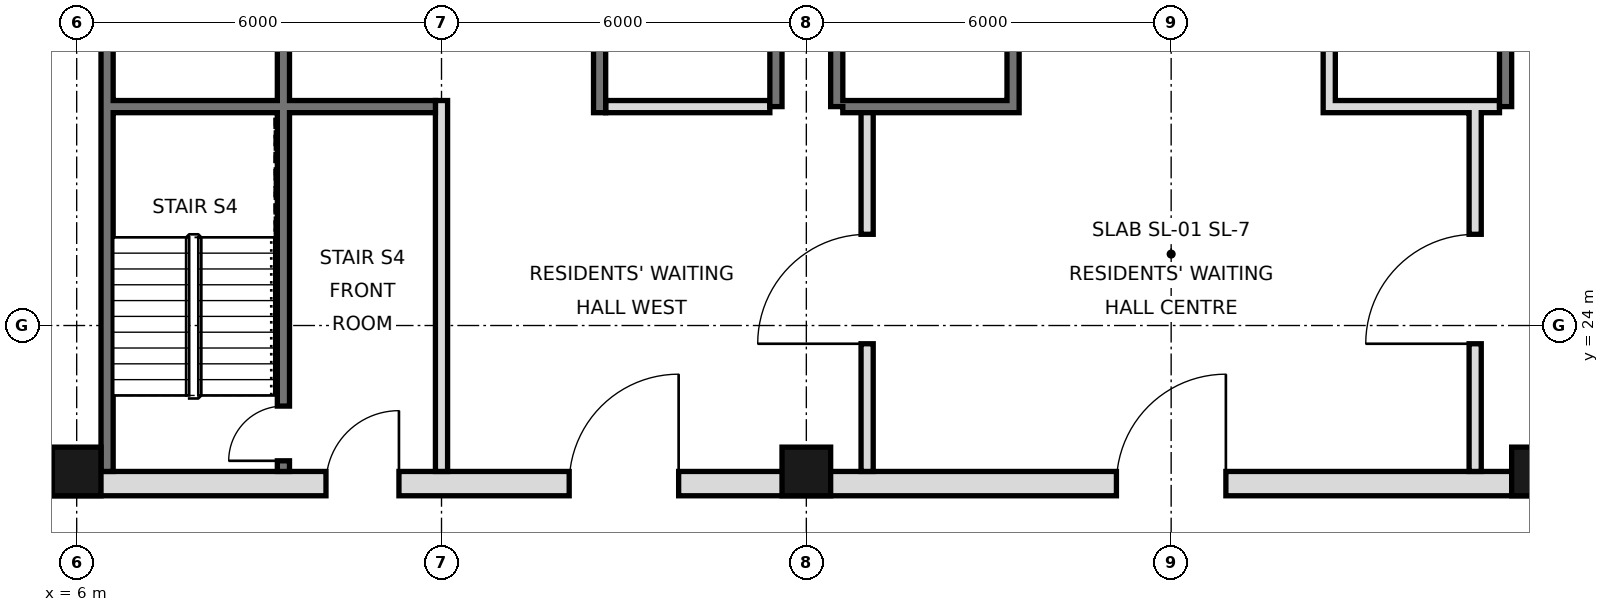
"""IFC4 building model, lengths in metres.
Left out: names, types, materials, properties, quantities, classifications, styles, units other than length and angle.
Written with IfcOpenShell. Run it as: python <this file> out.ifc"""

import sys

from ifc_helpers import new_model, si_unit, direction, frame, frame_2d, origin, origin_2d, place, context, subcontext, project, spatial, rectangle, hollow_rectangle, extrude, element, fill, save


model = new_model("IFC4")
c1 = context("Model", 3, precision=1e-05, world=origin(), true_north=direction((0.0, 1.0)))
c2 = subcontext(c1, "Body", "Model", "MODEL_VIEW")
j1 = project(units=[si_unit("LENGTHUNIT", "METRE"), si_unit("PLANEANGLEUNIT", "RADIAN")], contexts=[c1])
p1 = place(None, origin())
s1 = spatial("IfcSite", under=j1, at=p1, CompositionType="ELEMENT")
p2 = place(p1, origin())
s2 = spatial("IfcBuilding", under=s1, at=p2, CompositionType="ELEMENT")
p3 = place(p2, frame((0.0, 0.0, 202.8)))
s3 = spatial("IfcBuildingStorey", under=s2, at=p3, CompositionType="ELEMENT", Elevation=202.8)
for number, where, z_axis, x_axis in (
    (1, (6.0, 21.6, 0.0), (0.0, 0.0, 1.0), (1.0, 0.0, 0.0)),
    (2, (18.0, 21.6, 0.0), (0.0, 0.0, 1.0), (1.0, 0.0, 0.0)),
    (3, (30.0, 21.6, 0.0), (0.0, 0.0, 1.0), (1.0, 0.0, 0.0)),
):
    element("IfcColumn", number, at=place(p3, frame(where, z_axis=z_axis, x_axis=x_axis)), inside=s3, PredefinedType="COLUMN", context=c2, shape_type="SweptSolid", body=[
        extrude(hollow_rectangle(XDim=0.8, YDim=0.8, WallThickness=0.04, at=origin_2d()), origin(), (0.0, 0.0, 1.0), 3.6),
    ])
p4 = place(p3, frame((6.5, 21.6, 0.0), z_axis=(0.0, 0.0, 1.0), x_axis=(0.0, 1.0, 0.0)))
e4 = element("IfcWall", 4, at=p4, inside=s3, PredefinedType="SOLIDWALL", context=c2, shape_type="SweptSolid", body=[
    extrude(rectangle(XDim=23.5, YDim=0.2, at=frame_2d((11.75, 0.0))), origin(), (0.0, 0.0, 1.0), 3.42),
])
for number, where, z_axis, x_axis in (
    (5, (17.5, 27.6, 0.0), (0.0, 0.0, 1.0), (0.0, 1.0, 0.0)),
    (6, (18.5, 27.6, 0.0), (0.0, 0.0, 1.0), (0.0, 1.0, 0.0)),
    (7, (29.5, 27.6, 0.0), (0.0, 0.0, 1.0), (0.0, 1.0, 0.0)),
):
    element("IfcWall", number, at=place(p3, frame(where, z_axis=z_axis, x_axis=x_axis)), inside=s3, PredefinedType="SOLIDWALL", context=c2, shape_type="SweptSolid", body=[
        extrude(rectangle(XDim=17.5, YDim=0.2, at=frame_2d((8.75, 0.0))), origin(), (0.0, 0.0, 1.0), 3.42),
    ])
p5 = place(p3, frame((5.6, 21.4, 0.0), z_axis=(0.0, 0.0, 1.0), x_axis=(1.0, 0.0, 0.0)))
e8 = element("IfcWall", 8, at=p5, inside=s3, PredefinedType="SOLIDWALL", context=c2, shape_type="SweptSolid", body=[
    extrude(rectangle(XDim=36.8, YDim=0.4, at=frame_2d((18.4, 0.0))), origin(), (0.0, 0.0, 1.0), 3.42),
])
p6 = place(p5, frame((8.5, 0.0, 0.0)))
e9 = element("IfcOpeningElement", 9, at=p6, cuts=e8, PredefinedType="OPENING", context=c2, shape_type="SweptSolid", body=[
    extrude(rectangle(XDim=1.8, YDim=2.1, at=frame_2d((0.9, 1.05))), frame((0.0, 0.21, 0.0), z_axis=(0.0, -1.0, 0.0), x_axis=(1.0, 0.0, 0.0)), (0.0, 0.0, 1.0), 0.42),
])
p7 = place(p5, frame((17.5, 0.0, 0.0)))
e10 = element("IfcOpeningElement", 10, at=p7, cuts=e8, PredefinedType="OPENING", context=c2, shape_type="SweptSolid", body=[
    extrude(rectangle(XDim=1.8, YDim=2.1, at=frame_2d((0.9, 1.05))), frame((0.0, 0.21, 0.0), z_axis=(0.0, -1.0, 0.0), x_axis=(1.0, 0.0, 0.0)), (0.0, 0.0, 1.0), 0.42),
])
p8 = place(p5, frame((26.5, 0.0, 0.0)))
e11 = element("IfcOpeningElement", 11, at=p8, cuts=e8, PredefinedType="OPENING", context=c2, shape_type="SweptSolid", body=[
    extrude(rectangle(XDim=1.8, YDim=2.1, at=frame_2d((0.9, 1.05))), frame((0.0, 0.21, 0.0), z_axis=(0.0, -1.0, 0.0), x_axis=(1.0, 0.0, 0.0)), (0.0, 0.0, 1.0), 0.42),
])
p9 = place(p5, frame((4.5, 0.0, 0.0)))
e12 = element("IfcOpeningElement", 12, at=p9, cuts=e8, PredefinedType="OPENING", context=c2, shape_type="SweptSolid", body=[
    extrude(rectangle(XDim=1.2, YDim=2.1, at=frame_2d((0.6, 1.05))), frame((0.0, 0.21, 0.0), z_axis=(0.0, -1.0, 0.0), x_axis=(1.0, 0.0, 0.0)), (0.0, 0.0, 1.0), 0.42),
])
p10 = place(p5, frame((31.1, 0.0, 0.0)))
e13 = element("IfcOpeningElement", 13, at=p10, cuts=e8, PredefinedType="OPENING", context=c2, shape_type="SweptSolid", body=[
    extrude(rectangle(XDim=1.2, YDim=2.1, at=frame_2d((0.6, 1.05))), frame((0.0, 0.21, 0.0), z_axis=(0.0, -1.0, 0.0), x_axis=(1.0, 0.0, 0.0)), (0.0, 0.0, 1.0), 0.42),
])
p11 = place(p3, frame((19.0, 21.6, 0.0), z_axis=(0.0, 0.0, 1.0), x_axis=(0.0, 1.0, 0.0)))
e14 = element("IfcWall", 14, at=p11, inside=s3, PredefinedType="PARTITIONING", context=c2, shape_type="SweptSolid", body=[
    extrude(rectangle(XDim=6.0, YDim=0.2, at=frame_2d((3.0, 0.0))), origin(), (0.0, 0.0, 1.0), 3.42),
])
p12 = place(p11, frame((2.1, 0.0, 0.0)))
e15 = element("IfcOpeningElement", 15, at=p12, cuts=e14, PredefinedType="OPENING", context=c2, shape_type="SweptSolid", body=[
    extrude(rectangle(XDim=1.8, YDim=2.1, at=frame_2d((0.9, 1.05))), frame((0.0, 0.11, 0.0), z_axis=(0.0, -1.0, 0.0), x_axis=(1.0, 0.0, 0.0)), (0.0, 0.0, 1.0), 0.22),
])
p13 = place(p3, frame((29.0, 21.6, 0.0), z_axis=(0.0, 0.0, 1.0), x_axis=(0.0, 1.0, 0.0)))
e16 = element("IfcWall", 16, at=p13, inside=s3, PredefinedType="PARTITIONING", context=c2, shape_type="SweptSolid", body=[
    extrude(rectangle(XDim=6.0, YDim=0.2, at=frame_2d((3.0, 0.0))), origin(), (0.0, 0.0, 1.0), 3.42),
])
p14 = place(p13, frame((2.1, 0.0, 0.0)))
e17 = element("IfcOpeningElement", 17, at=p14, cuts=e16, PredefinedType="OPENING", context=c2, shape_type="SweptSolid", body=[
    extrude(rectangle(XDim=1.8, YDim=2.1, at=frame_2d((0.9, 1.05))), frame((0.0, 0.11, 0.0), z_axis=(0.0, -1.0, 0.0), x_axis=(1.0, 0.0, 0.0)), (0.0, 0.0, 1.0), 0.22),
])
p15 = place(p3, frame((12.0, 21.6, 0.0), z_axis=(0.0, 0.0, 1.0), x_axis=(0.0, 1.0, 0.0)))
e18 = element("IfcWall", 18, at=p15, inside=s3, PredefinedType="PARTITIONING", context=c2, shape_type="SweptSolid", body=[
    extrude(rectangle(XDim=6.1, YDim=0.2, at=frame_2d((3.05, 0.0))), origin(), (0.0, 0.0, 1.0), 3.42),
])
p16 = place(p3, frame((14.6, 27.5, 0.0), z_axis=(0.0, 0.0, 1.0), x_axis=(0.0, 1.0, 0.0)))
e19 = element("IfcWall", 19, at=p16, inside=s3, PredefinedType="SOLIDWALL", context=c2, shape_type="SweptSolid", body=[
    extrude(rectangle(XDim=17.5, YDim=0.2, at=frame_2d((8.75, 0.0))), origin(), (0.0, 0.0, 1.0), 3.42),
])
p17 = place(p16, frame((15.4, 0.0, 0.0)))
e20 = element("IfcOpeningElement", 20, at=p17, cuts=e19, PredefinedType="OPENING", context=c2, shape_type="SweptSolid", body=[
    extrude(rectangle(XDim=1.1, YDim=2.1, at=frame_2d((0.55, 1.05))), frame((0.0, 0.11, 0.0), z_axis=(0.0, -1.0, 0.0), x_axis=(1.0, 0.0, 0.0)), (0.0, 0.0, 1.0), 0.22),
])
p18 = place(p16, frame((2.7, 0.0, 0.0)))
e21 = element("IfcOpeningElement", 21, at=p18, cuts=e19, PredefinedType="OPENING", context=c2, shape_type="SweptSolid", body=[
    extrude(rectangle(XDim=1.0, YDim=2.1, at=frame_2d((0.5, 1.05))), frame((0.0, 0.11, 0.0), z_axis=(0.0, -1.0, 0.0), x_axis=(1.0, 0.0, 0.0)), (0.0, 0.0, 1.0), 0.22),
])
p19 = place(p16, frame((9.9, 0.0, 0.0)))
e22 = element("IfcOpeningElement", 22, at=p19, cuts=e19, PredefinedType="OPENING", context=c2, shape_type="SweptSolid", body=[
    extrude(rectangle(XDim=0.9, YDim=2.1, at=frame_2d((0.45, 1.05))), frame((0.0, 0.11, 0.0), z_axis=(0.0, -1.0, 0.0), x_axis=(1.0, 0.0, 0.0)), (0.0, 0.0, 1.0), 0.22),
])
p20 = place(p3, frame((21.4, 27.5, 0.0), z_axis=(0.0, 0.0, 1.0), x_axis=(0.0, 1.0, 0.0)))
e23 = element("IfcWall", 23, at=p20, inside=s3, PredefinedType="SOLIDWALL", context=c2, shape_type="SweptSolid", body=[
    extrude(rectangle(XDim=17.5, YDim=0.2, at=frame_2d((8.75, 0.0))), origin(), (0.0, 0.0, 1.0), 3.42),
])
p21 = place(p20, frame((16.2, 0.0, 0.0)))
e24 = element("IfcOpeningElement", 24, at=p21, cuts=e23, PredefinedType="OPENING", context=c2, shape_type="SweptSolid", body=[
    extrude(rectangle(XDim=1.0, YDim=2.1, at=frame_2d((0.5, 1.05))), frame((0.0, 0.11, 0.0), z_axis=(0.0, -1.0, 0.0), x_axis=(1.0, 0.0, 0.0)), (0.0, 0.0, 1.0), 0.22),
])
p22 = place(p20, frame((7.4, 0.0, 0.0)))
e25 = element("IfcOpeningElement", 25, at=p22, cuts=e23, PredefinedType="OPENING", context=c2, shape_type="SweptSolid", body=[
    extrude(rectangle(XDim=0.9, YDim=2.1, at=frame_2d((0.45, 1.05))), frame((0.0, 0.11, 0.0), z_axis=(0.0, -1.0, 0.0), x_axis=(1.0, 0.0, 0.0)), (0.0, 0.0, 1.0), 0.22),
])
p23 = place(p3, frame((26.6, 27.5, 0.0), z_axis=(0.0, 0.0, 1.0), x_axis=(0.0, 1.0, 0.0)))
e26 = element("IfcWall", 26, at=p23, inside=s3, PredefinedType="SOLIDWALL", context=c2, shape_type="SweptSolid", body=[
    extrude(rectangle(XDim=17.5, YDim=0.2, at=frame_2d((8.75, 0.0))), origin(), (0.0, 0.0, 1.0), 3.42),
])
p24 = place(p23, frame((4.3, 0.0, 0.0)))
e27 = element("IfcOpeningElement", 27, at=p24, cuts=e26, PredefinedType="OPENING", context=c2, shape_type="SweptSolid", body=[
    extrude(rectangle(XDim=0.9, YDim=2.1, at=frame_2d((0.45, 1.05))), frame((0.0, 0.11, 0.0), z_axis=(0.0, -1.0, 0.0), x_axis=(1.0, 0.0, 0.0)), (0.0, 0.0, 1.0), 0.22),
])
p25 = place(p23, frame((10.35, 0.0, 0.0)))
e28 = element("IfcOpeningElement", 28, at=p25, cuts=e26, PredefinedType="OPENING", context=c2, shape_type="SweptSolid", body=[
    extrude(rectangle(XDim=1.0, YDim=2.1, at=frame_2d((0.5, 1.05))), frame((0.0, 0.11, 0.0), z_axis=(0.0, -1.0, 0.0), x_axis=(1.0, 0.0, 0.0)), (0.0, 0.0, 1.0), 0.22),
])
p26 = place(p23, frame((15.475, 0.0, 0.0)))
e29 = element("IfcOpeningElement", 29, at=p26, cuts=e26, PredefinedType="OPENING", context=c2, shape_type="SweptSolid", body=[
    extrude(rectangle(XDim=1.0, YDim=2.1, at=frame_2d((0.5, 1.05))), frame((0.0, 0.11, 0.0), z_axis=(0.0, -1.0, 0.0), x_axis=(1.0, 0.0, 0.0)), (0.0, 0.0, 1.0), 0.22),
])
p27 = place(p3, frame((9.4, 21.6, 0.0), z_axis=(0.0, 0.0, 1.0), x_axis=(0.0, 1.0, 0.0)))
e30 = element("IfcWall", 30, at=p27, inside=s3, PredefinedType="SOLIDWALL", context=c2, shape_type="SweptSolid", body=[
    extrude(rectangle(XDim=23.4, YDim=0.2, at=frame_2d((11.7, 0.0))), origin(), (0.0, 0.0, 1.0), 3.42),
])
p28 = place(p27, frame((7.8, 0.0, 0.0)))
e31 = element("IfcOpeningElement", 31, at=p28, cuts=e30, PredefinedType="OPENING", context=c2, shape_type="SweptSolid", body=[
    extrude(rectangle(XDim=1.0, YDim=2.1, at=frame_2d((0.5, 1.05))), frame((0.0, 0.11, 0.0), z_axis=(0.0, -1.0, 0.0), x_axis=(1.0, 0.0, 0.0)), (0.0, 0.0, 1.0), 0.22),
])
p29 = place(p27, frame((12.45, 0.0, 0.0)))
e32 = element("IfcOpeningElement", 32, at=p29, cuts=e30, PredefinedType="OPENING", context=c2, shape_type="SweptSolid", body=[
    extrude(rectangle(XDim=1.0, YDim=2.1, at=frame_2d((0.5, 1.05))), frame((0.0, 0.11, 0.0), z_axis=(0.0, -1.0, 0.0), x_axis=(1.0, 0.0, 0.0)), (0.0, 0.0, 1.0), 0.22),
])
p30 = place(p27, frame((22.1, 0.0, 0.0)))
e33 = element("IfcOpeningElement", 33, at=p30, cuts=e30, PredefinedType="OPENING", context=c2, shape_type="SweptSolid", body=[
    extrude(rectangle(XDim=1.0, YDim=2.1, at=frame_2d((0.5, 1.05))), frame((0.0, 0.11, 0.0), z_axis=(0.0, -1.0, 0.0), x_axis=(1.0, 0.0, 0.0)), (0.0, 0.0, 1.0), 0.22),
])
p31 = place(p27, frame((0.175, 0.0, 0.0)))
e34 = element("IfcOpeningElement", 34, at=p31, cuts=e30, PredefinedType="OPENING", context=c2, shape_type="SweptSolid", body=[
    extrude(rectangle(XDim=0.9, YDim=2.1, at=frame_2d((0.45, 1.05))), frame((0.0, 0.11, 0.0), z_axis=(0.0, -1.0, 0.0), x_axis=(1.0, 0.0, 0.0)), (0.0, 0.0, 1.0), 0.22),
])
p32 = place(p3, frame((14.7, 27.6, 0.0), z_axis=(0.0, 0.0, 1.0), x_axis=(1.0, 0.0, 0.0)))
e35 = element("IfcWall", 35, at=p32, inside=s3, PredefinedType="PARTITIONING", context=c2, shape_type="SweptSolid", body=[
    extrude(rectangle(XDim=2.7, YDim=0.2, at=frame_2d((1.35, 0.0))), origin(), (0.0, 0.0, 1.0), 3.42),
])
for number, where, z_axis, x_axis in (
    (36, (18.6, 27.6, 0.0), (0.0, 0.0, 1.0), (1.0, 0.0, 0.0)),
    (37, (26.7, 27.6, 0.0), (0.0, 0.0, 1.0), (1.0, 0.0, 0.0)),
):
    element("IfcWall", number, at=place(p3, frame(where, z_axis=z_axis, x_axis=x_axis)), inside=s3, PredefinedType="SOLIDWALL", context=c2, shape_type="SweptSolid", body=[
        extrude(rectangle(XDim=2.7, YDim=0.2, at=frame_2d((1.35, 0.0))), origin(), (0.0, 0.0, 1.0), 3.42),
    ])
p33 = place(p3, frame((6.6, 27.6, 0.0), z_axis=(0.0, 0.0, 1.0), x_axis=(1.0, 0.0, 0.0)))
e38 = element("IfcWall", 38, at=p33, inside=s3, PredefinedType="SOLIDWALL", context=c2, shape_type="SweptSolid", body=[
    extrude(rectangle(XDim=5.3, YDim=0.2, at=frame_2d((2.65, 0.0))), origin(), (0.0, 0.0, 1.0), 3.42),
])
p34 = place(p6, frame((1.8, 0.0, 0.0), z_axis=(0.0, 0.0, 1.0), x_axis=(-1.0, 0.0, 0.0)))
e39 = element("IfcDoor", 39, at=p34, inside=s3, OperationType="SINGLE_SWING_LEFT", PredefinedType="DOOR", context=c2, shape_type="SweptSolid", body=[
    extrude(rectangle(XDim=1.8, YDim=2.1, at=frame_2d((0.9, 1.05))), frame((0.0, 0.025, 0.0), z_axis=(0.0, -1.0, 0.0), x_axis=(1.0, 0.0, 0.0)), (0.0, 0.0, 1.0), 0.05),
])
fill(e9, e39)
p35 = place(p12, origin())
e40 = element("IfcDoor", 40, at=p35, inside=s3, OperationType="SINGLE_SWING_LEFT", PredefinedType="DOOR", context=c2, shape_type="SweptSolid", body=[
    extrude(rectangle(XDim=1.8, YDim=2.1, at=frame_2d((0.9, 1.05))), frame((0.0, 0.025, 0.0), z_axis=(0.0, -1.0, 0.0), x_axis=(1.0, 0.0, 0.0)), (0.0, 0.0, 1.0), 0.05),
])
fill(e15, e40)
p36 = place(p7, frame((1.8, 0.0, 0.0), z_axis=(0.0, 0.0, 1.0), x_axis=(-1.0, 0.0, 0.0)))
e41 = element("IfcDoor", 41, at=p36, inside=s3, OperationType="SINGLE_SWING_LEFT", PredefinedType="DOOR", context=c2, shape_type="SweptSolid", body=[
    extrude(rectangle(XDim=1.8, YDim=2.1, at=frame_2d((0.9, 1.05))), frame((0.0, 0.025, 0.0), z_axis=(0.0, -1.0, 0.0), x_axis=(1.0, 0.0, 0.0)), (0.0, 0.0, 1.0), 0.05),
])
fill(e10, e41)
p37 = place(p14, origin())
e42 = element("IfcDoor", 42, at=p37, inside=s3, OperationType="SINGLE_SWING_LEFT", PredefinedType="DOOR", context=c2, shape_type="SweptSolid", body=[
    extrude(rectangle(XDim=1.8, YDim=2.1, at=frame_2d((0.9, 1.05))), frame((0.0, 0.025, 0.0), z_axis=(0.0, -1.0, 0.0), x_axis=(1.0, 0.0, 0.0)), (0.0, 0.0, 1.0), 0.05),
])
fill(e17, e42)
p38 = place(p9, frame((1.2, 0.0, 0.0), z_axis=(0.0, 0.0, 1.0), x_axis=(-1.0, 0.0, 0.0)))
e43 = element("IfcDoor", 43, at=p38, inside=s3, OperationType="SINGLE_SWING_LEFT", PredefinedType="DOOR", context=c2, shape_type="SweptSolid", body=[
    extrude(rectangle(XDim=1.2, YDim=2.1, at=frame_2d((0.6, 1.05))), frame((0.0, 0.025, 0.0), z_axis=(0.0, -1.0, 0.0), x_axis=(1.0, 0.0, 0.0)), (0.0, 0.0, 1.0), 0.05),
])
fill(e12, e43)
p39 = place(p31, origin())
e44 = element("IfcDoor", 44, at=p39, inside=s3, OperationType="SINGLE_SWING_LEFT", PredefinedType="DOOR", context=c2, shape_type="SweptSolid", body=[
    extrude(rectangle(XDim=0.9, YDim=2.1, at=frame_2d((0.45, 1.05))), frame((0.0, 0.025, 0.0), z_axis=(0.0, -1.0, 0.0), x_axis=(1.0, 0.0, 0.0)), (0.0, 0.0, 1.0), 0.05),
])
fill(e34, e44)
save(model, sys.argv[1])
